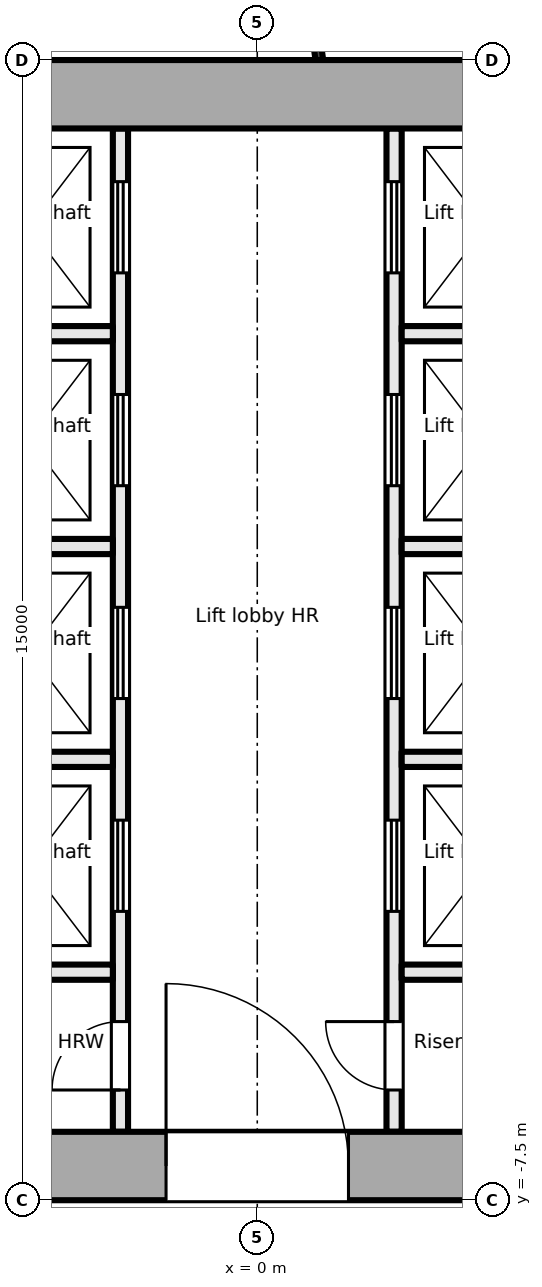
"""IFC4 building model, lengths in metres.
Left out: names, types, materials, properties, quantities, classifications, styles, units other than length and angle.
Written with IfcOpenShell. Run it as: python <this file> out.ifc"""

import sys

from ifc_helpers import new_model, si_unit, direction, frame, frame_2d, origin, place, context, subcontext, project, spatial, rectangle, extrude, element, fill, save


model = new_model("IFC4")
c1 = context("Model", 3, precision=1e-05, world=origin(), true_north=direction((0.0, 1.0)))
c2 = subcontext(c1, "Body", "Model", "MODEL_VIEW")
j1 = project(units=[si_unit("LENGTHUNIT", "METRE"), si_unit("PLANEANGLEUNIT", "RADIAN")], contexts=[c1])
p1 = place(None, origin())
s1 = spatial("IfcSite", under=j1, at=p1, CompositionType="ELEMENT")
p2 = place(p1, origin())
s2 = spatial("IfcBuilding", under=s1, at=p2, CompositionType="ELEMENT")
p3 = place(p2, frame((0.0, 0.0, 172.4)))
s3 = spatial("IfcBuildingStorey", under=s2, at=p3, CompositionType="ELEMENT", Elevation=172.4)
p4 = place(p3, frame((-18.0, -7.05, -0.2), z_axis=(0.0, 0.0, 1.0), x_axis=(1.0, 0.0, 0.0)))
e1 = element("IfcWall", 1, at=p4, inside=s3, PredefinedType="SHEAR", context=c2, shape_type="SweptSolid", body=[
    extrude(rectangle(XDim=36.0, YDim=0.9, at=frame_2d((18.0, 0.0))), origin(), (0.0, 0.0, 1.0), 3.9),
])
p5 = place(p4, frame((8.1, 0.0, 0.2)))
e2 = element("IfcOpeningElement", 2, at=p5, cuts=e1, PredefinedType="OPENING", context=c2, shape_type="SweptSolid", body=[
    extrude(rectangle(XDim=1.8, YDim=2.1, at=frame_2d((0.9, 1.05))), frame((0.0, 0.46, 0.0), z_axis=(0.0, -1.0, 0.0), x_axis=(1.0, 0.0, 0.0)), (0.0, 0.0, 1.0), 0.921),
])
p6 = place(p4, frame((16.8, 0.0, 0.2)))
e3 = element("IfcOpeningElement", 3, at=p6, cuts=e1, PredefinedType="OPENING", context=c2, shape_type="SweptSolid", body=[
    extrude(rectangle(XDim=2.4, YDim=2.1, at=frame_2d((1.2, 1.05))), frame((0.0, 0.46, 0.0), z_axis=(0.0, -1.0, 0.0), x_axis=(1.0, 0.0, 0.0)), (0.0, 0.0, 1.0), 0.921),
])
p7 = place(p4, frame((26.1, 0.0, 0.2)))
e4 = element("IfcOpeningElement", 4, at=p7, cuts=e1, PredefinedType="OPENING", context=c2, shape_type="SweptSolid", body=[
    extrude(rectangle(XDim=2.4, YDim=2.1, at=frame_2d((1.2, 1.05))), frame((0.0, 0.46, 0.0), z_axis=(0.0, -1.0, 0.0), x_axis=(1.0, 0.0, 0.0)), (0.0, 0.0, 1.0), 0.921),
])
p8 = place(p3, frame((-18.0, 7.05, -0.2), z_axis=(0.0, 0.0, 1.0), x_axis=(1.0, 0.0, 0.0)))
e5 = element("IfcWall", 5, at=p8, inside=s3, PredefinedType="SHEAR", context=c2, shape_type="SweptSolid", body=[
    extrude(rectangle(XDim=36.0, YDim=0.9, at=frame_2d((18.0, 0.0))), origin(), (0.0, 0.0, 1.0), 3.9),
])
p9 = place(p3, frame((-1.8, -6.6, 0.0), z_axis=(0.0, 0.0, 1.0), x_axis=(0.0, 1.0, 0.0)))
e6 = element("IfcWall", 6, at=p9, inside=s3, PredefinedType="PARTITIONING", context=c2, shape_type="SweptSolid", body=[
    extrude(rectangle(XDim=13.2, YDim=0.2, at=frame_2d((6.6, 0.0))), origin(), (0.0, 0.0, 1.0), 3.7),
])
p10 = place(p9, frame((0.55, 0.0, 0.0)))
e7 = element("IfcOpeningElement", 7, at=p10, cuts=e6, PredefinedType="OPENING", context=c2, shape_type="SweptSolid", body=[
    extrude(rectangle(XDim=0.9, YDim=2.1, at=frame_2d((0.45, 1.05))), frame((0.0, 0.111, 0.0), z_axis=(0.0, -1.0, 0.0), x_axis=(1.0, 0.0, 0.0)), (0.0, 0.0, 1.0), 0.221),
])
p11 = place(p9, frame((2.9, 0.0, 0.0)))
e8 = element("IfcOpeningElement", 8, at=p11, cuts=e6, PredefinedType="OPENING", context=c2, shape_type="SweptSolid", body=[
    extrude(rectangle(XDim=1.2, YDim=2.1, at=frame_2d((0.6, 1.05))), frame((0.0, 0.111, 0.0), z_axis=(0.0, -1.0, 0.0), x_axis=(1.0, 0.0, 0.0)), (0.0, 0.0, 1.0), 0.221),
])
p12 = place(p9, frame((5.7, 0.0, 0.0)))
e9 = element("IfcOpeningElement", 9, at=p12, cuts=e6, PredefinedType="OPENING", context=c2, shape_type="SweptSolid", body=[
    extrude(rectangle(XDim=1.2, YDim=2.1, at=frame_2d((0.6, 1.05))), frame((0.0, 0.111, 0.0), z_axis=(0.0, -1.0, 0.0), x_axis=(1.0, 0.0, 0.0)), (0.0, 0.0, 1.0), 0.221),
])
p13 = place(p9, frame((8.5, 0.0, 0.0)))
e10 = element("IfcOpeningElement", 10, at=p13, cuts=e6, PredefinedType="OPENING", context=c2, shape_type="SweptSolid", body=[
    extrude(rectangle(XDim=1.2, YDim=2.1, at=frame_2d((0.6, 1.05))), frame((0.0, 0.111, 0.0), z_axis=(0.0, -1.0, 0.0), x_axis=(1.0, 0.0, 0.0)), (0.0, 0.0, 1.0), 0.221),
])
p14 = place(p9, frame((11.3, 0.0, 0.0)))
e11 = element("IfcOpeningElement", 11, at=p14, cuts=e6, PredefinedType="OPENING", context=c2, shape_type="SweptSolid", body=[
    extrude(rectangle(XDim=1.2, YDim=2.1, at=frame_2d((0.6, 1.05))), frame((0.0, 0.111, 0.0), z_axis=(0.0, -1.0, 0.0), x_axis=(1.0, 0.0, 0.0)), (0.0, 0.0, 1.0), 0.221),
])
p15 = place(p3, frame((1.8, -6.6, 0.0), z_axis=(0.0, 0.0, 1.0), x_axis=(0.0, 1.0, 0.0)))
e12 = element("IfcWall", 12, at=p15, inside=s3, PredefinedType="PARTITIONING", context=c2, shape_type="SweptSolid", body=[
    extrude(rectangle(XDim=13.2, YDim=0.2, at=frame_2d((6.6, 0.0))), origin(), (0.0, 0.0, 1.0), 3.7),
])
p16 = place(p15, frame((0.55, 0.0, 0.0)))
e13 = element("IfcOpeningElement", 13, at=p16, cuts=e12, PredefinedType="OPENING", context=c2, shape_type="SweptSolid", body=[
    extrude(rectangle(XDim=0.9, YDim=2.1, at=frame_2d((0.45, 1.05))), frame((0.0, 0.111, 0.0), z_axis=(0.0, -1.0, 0.0), x_axis=(1.0, 0.0, 0.0)), (0.0, 0.0, 1.0), 0.221),
])
p17 = place(p15, frame((2.9, 0.0, 0.0)))
e14 = element("IfcOpeningElement", 14, at=p17, cuts=e12, PredefinedType="OPENING", context=c2, shape_type="SweptSolid", body=[
    extrude(rectangle(XDim=1.2, YDim=2.1, at=frame_2d((0.6, 1.05))), frame((0.0, 0.111, 0.0), z_axis=(0.0, -1.0, 0.0), x_axis=(1.0, 0.0, 0.0)), (0.0, 0.0, 1.0), 0.221),
])
p18 = place(p15, frame((5.7, 0.0, 0.0)))
e15 = element("IfcOpeningElement", 15, at=p18, cuts=e12, PredefinedType="OPENING", context=c2, shape_type="SweptSolid", body=[
    extrude(rectangle(XDim=1.2, YDim=2.1, at=frame_2d((0.6, 1.05))), frame((0.0, 0.111, 0.0), z_axis=(0.0, -1.0, 0.0), x_axis=(1.0, 0.0, 0.0)), (0.0, 0.0, 1.0), 0.221),
])
p19 = place(p15, frame((8.5, 0.0, 0.0)))
e16 = element("IfcOpeningElement", 16, at=p19, cuts=e12, PredefinedType="OPENING", context=c2, shape_type="SweptSolid", body=[
    extrude(rectangle(XDim=1.2, YDim=2.1, at=frame_2d((0.6, 1.05))), frame((0.0, 0.111, 0.0), z_axis=(0.0, -1.0, 0.0), x_axis=(1.0, 0.0, 0.0)), (0.0, 0.0, 1.0), 0.221),
])
p20 = place(p15, frame((11.3, 0.0, 0.0)))
e17 = element("IfcOpeningElement", 17, at=p20, cuts=e12, PredefinedType="OPENING", context=c2, shape_type="SweptSolid", body=[
    extrude(rectangle(XDim=1.2, YDim=2.1, at=frame_2d((0.6, 1.05))), frame((0.0, 0.111, 0.0), z_axis=(0.0, -1.0, 0.0), x_axis=(1.0, 0.0, 0.0)), (0.0, 0.0, 1.0), 0.221),
])
for number, where, z_axis, x_axis in (
    (18, (-4.2, -1.7, 0.0), (0.0, 0.0, 1.0), (1.0, 0.0, 0.0)),
    (19, (-4.2, 1.1, 0.0), (0.0, 0.0, 1.0), (1.0, 0.0, 0.0)),
    (20, (-4.2, 3.9, 0.0), (0.0, 0.0, 1.0), (1.0, 0.0, 0.0)),
    (21, (-4.2, -4.5, 0.0), (0.0, 0.0, 1.0), (1.0, 0.0, 0.0)),
    (22, (1.9, -1.7, 0.0), (0.0, 0.0, 1.0), (1.0, 0.0, 0.0)),
    (23, (1.9, 1.1, 0.0), (0.0, 0.0, 1.0), (1.0, 0.0, 0.0)),
    (24, (1.9, 3.9, 0.0), (0.0, 0.0, 1.0), (1.0, 0.0, 0.0)),
    (25, (1.9, -4.5, 0.0), (0.0, 0.0, 1.0), (1.0, 0.0, 0.0)),
):
    element("IfcWall", number, at=place(p3, frame(where, z_axis=z_axis, x_axis=x_axis)), inside=s3, PredefinedType="PARTITIONING", context=c2, shape_type="SweptSolid", body=[
        extrude(rectangle(XDim=2.3, YDim=0.2, at=frame_2d((1.15, 0.0))), origin(), (0.0, 0.0, 1.0), 3.7),
    ])
p21 = place(p3, frame((0.817, 7.5, 0.0), z_axis=(0.0, 0.0, 1.0), x_axis=(-0.139230432727, 0.990260009595, 0.0)))
e26 = element("IfcWall", 26, at=p21, inside=s3, PredefinedType="PARTITIONING", context=c2, shape_type="SweptSolid", body=[
    extrude(rectangle(XDim=3.526, YDim=0.1, at=frame_2d((1.763, 0.0))), origin(), (0.0, 0.0, 1.0), 3.7),
])
p22 = place(p10, origin())
e27 = element("IfcDoor", 27, at=p22, inside=s3, OperationType="SINGLE_SWING_LEFT", PredefinedType="DOOR", context=c2, shape_type="SweptSolid", body=[
    extrude(rectangle(XDim=0.9, YDim=2.1, at=frame_2d((0.45, 1.05))), frame((0.0, 0.025, 0.0), z_axis=(0.0, -1.0, 0.0), x_axis=(1.0, 0.0, 0.0)), (0.0, 0.0, 1.0), 0.05),
])
fill(e7, e27)
p23 = place(p11, origin())
e28 = element("IfcDoor", 28, at=p23, inside=s3, OperationType="DOUBLE_DOOR_SLIDING", PredefinedType="DOOR", context=c2, shape_type="SweptSolid", body=[
    extrude(rectangle(XDim=1.2, YDim=2.1, at=frame_2d((0.6, 1.05))), frame((0.0, 0.025, 0.0), z_axis=(0.0, -1.0, 0.0), x_axis=(1.0, 0.0, 0.0)), (0.0, 0.0, 1.0), 0.05),
])
fill(e8, e28)
p24 = place(p12, origin())
e29 = element("IfcDoor", 29, at=p24, inside=s3, OperationType="DOUBLE_DOOR_SLIDING", PredefinedType="DOOR", context=c2, shape_type="SweptSolid", body=[
    extrude(rectangle(XDim=1.2, YDim=2.1, at=frame_2d((0.6, 1.05))), frame((0.0, 0.025, 0.0), z_axis=(0.0, -1.0, 0.0), x_axis=(1.0, 0.0, 0.0)), (0.0, 0.0, 1.0), 0.05),
])
fill(e9, e29)
p25 = place(p13, origin())
e30 = element("IfcDoor", 30, at=p25, inside=s3, OperationType="DOUBLE_DOOR_SLIDING", PredefinedType="DOOR", context=c2, shape_type="SweptSolid", body=[
    extrude(rectangle(XDim=1.2, YDim=2.1, at=frame_2d((0.6, 1.05))), frame((0.0, 0.025, 0.0), z_axis=(0.0, -1.0, 0.0), x_axis=(1.0, 0.0, 0.0)), (0.0, 0.0, 1.0), 0.05),
])
fill(e10, e30)
p26 = place(p14, origin())
e31 = element("IfcDoor", 31, at=p26, inside=s3, OperationType="DOUBLE_DOOR_SLIDING", PredefinedType="DOOR", context=c2, shape_type="SweptSolid", body=[
    extrude(rectangle(XDim=1.2, YDim=2.1, at=frame_2d((0.6, 1.05))), frame((0.0, 0.025, 0.0), z_axis=(0.0, -1.0, 0.0), x_axis=(1.0, 0.0, 0.0)), (0.0, 0.0, 1.0), 0.05),
])
fill(e11, e31)
p27 = place(p16, origin())
e32 = element("IfcDoor", 32, at=p27, inside=s3, OperationType="SINGLE_SWING_RIGHT", PredefinedType="DOOR", context=c2, shape_type="SweptSolid", body=[
    extrude(rectangle(XDim=0.9, YDim=2.1, at=frame_2d((0.45, 1.05))), frame((0.0, 0.025, 0.0), z_axis=(0.0, -1.0, 0.0), x_axis=(1.0, 0.0, 0.0)), (0.0, 0.0, 1.0), 0.05),
])
fill(e13, e32)
p28 = place(p17, origin())
e33 = element("IfcDoor", 33, at=p28, inside=s3, OperationType="DOUBLE_DOOR_SLIDING", PredefinedType="DOOR", context=c2, shape_type="SweptSolid", body=[
    extrude(rectangle(XDim=1.2, YDim=2.1, at=frame_2d((0.6, 1.05))), frame((0.0, 0.025, 0.0), z_axis=(0.0, -1.0, 0.0), x_axis=(1.0, 0.0, 0.0)), (0.0, 0.0, 1.0), 0.05),
])
fill(e14, e33)
p29 = place(p18, origin())
e34 = element("IfcDoor", 34, at=p29, inside=s3, OperationType="DOUBLE_DOOR_SLIDING", PredefinedType="DOOR", context=c2, shape_type="SweptSolid", body=[
    extrude(rectangle(XDim=1.2, YDim=2.1, at=frame_2d((0.6, 1.05))), frame((0.0, 0.025, 0.0), z_axis=(0.0, -1.0, 0.0), x_axis=(1.0, 0.0, 0.0)), (0.0, 0.0, 1.0), 0.05),
])
fill(e15, e34)
p30 = place(p19, origin())
e35 = element("IfcDoor", 35, at=p30, inside=s3, OperationType="DOUBLE_DOOR_SLIDING", PredefinedType="DOOR", context=c2, shape_type="SweptSolid", body=[
    extrude(rectangle(XDim=1.2, YDim=2.1, at=frame_2d((0.6, 1.05))), frame((0.0, 0.025, 0.0), z_axis=(0.0, -1.0, 0.0), x_axis=(1.0, 0.0, 0.0)), (0.0, 0.0, 1.0), 0.05),
])
fill(e16, e35)
p31 = place(p20, origin())
e36 = element("IfcDoor", 36, at=p31, inside=s3, OperationType="DOUBLE_DOOR_SLIDING", PredefinedType="DOOR", context=c2, shape_type="SweptSolid", body=[
    extrude(rectangle(XDim=1.2, YDim=2.1, at=frame_2d((0.6, 1.05))), frame((0.0, 0.025, 0.0), z_axis=(0.0, -1.0, 0.0), x_axis=(1.0, 0.0, 0.0)), (0.0, 0.0, 1.0), 0.05),
])
fill(e17, e36)
p32 = place(p6, origin())
e37 = element("IfcDoor", 37, at=p32, inside=s3, OperationType="DOUBLE_DOOR_DOUBLE_SWING", PredefinedType="DOOR", context=c2, shape_type="SweptSolid", body=[
    extrude(rectangle(XDim=2.4, YDim=2.1, at=frame_2d((1.2, 1.05))), frame((0.0, 0.025, 0.0), z_axis=(0.0, -1.0, 0.0), x_axis=(1.0, 0.0, 0.0)), (0.0, 0.0, 1.0), 0.05),
])
fill(e3, e37)
save(model, sys.argv[1])
